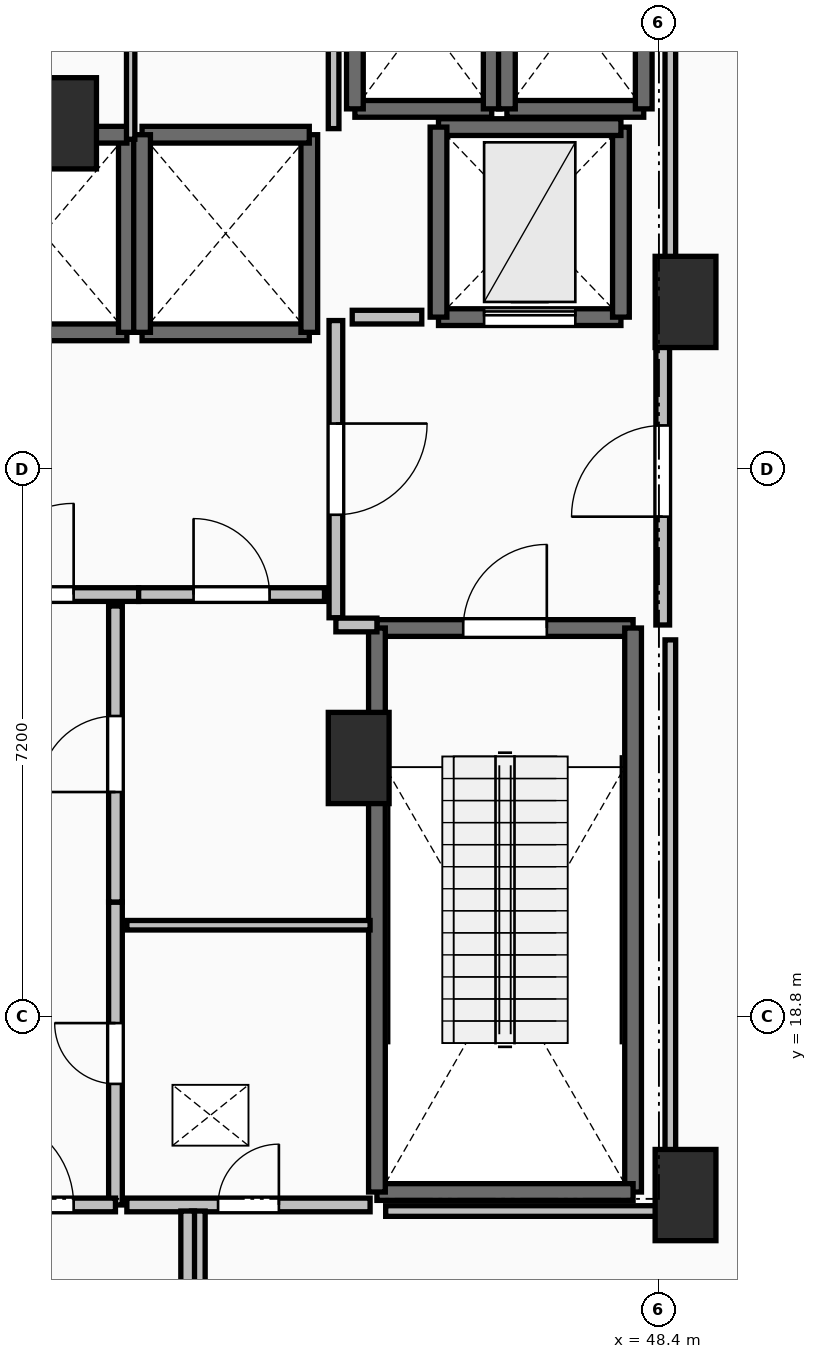
"""IFC4 building model, lengths in metres.
Left out: names, types, materials, properties, quantities, classifications, styles, units other than length and angle.
Written with IfcOpenShell. Run it as: python <this file> out.ifc"""

import sys

from ifc_helpers import new_model, si_unit, direction, frame, frame_2d, origin, origin_2d, place, context, subcontext, project, spatial, rectangle, extrude, element, fill, save


model = new_model("IFC4")
c1 = context("Model", 3, precision=1e-05, world=origin(), true_north=direction((0.0, 1.0)))
c2 = subcontext(c1, "Body", "Model", "MODEL_VIEW")
j1 = project(units=[si_unit("LENGTHUNIT", "METRE"), si_unit("PLANEANGLEUNIT", "RADIAN")], contexts=[c1])
p1 = place(None, origin())
s1 = spatial("IfcSite", under=j1, at=p1, CompositionType="ELEMENT")
p2 = place(p1, origin())
s2 = spatial("IfcBuilding", under=s1, at=p2, CompositionType="ELEMENT")
p3 = place(p2, frame((0.0, 0.0, 14.4)))
s3 = spatial("IfcBuildingStorey", under=s2, at=p3, CompositionType="ELEMENT", Elevation=14.4)
for number, where, z_axis, x_axis in (
    (1, (48.75, 28.2, 0.0), (0.0, 0.0, 1.0), (1.0, 0.0, 0.0)),
    (2, (48.75, 16.45, 0.0), (0.0, 0.0, 1.0), (1.0, 0.0, 0.0)),
    (3, (44.45, 22.2, 0.0), (0.0, 0.0, 1.0), (1.0, 0.0, 0.0)),
    (4, (40.6, 30.55, 0.0), (0.0, 0.0, 1.0), (1.0, 0.0, 0.0)),
):
    element("IfcColumn", number, at=place(p3, frame(where, z_axis=z_axis, x_axis=x_axis)), inside=s3, PredefinedType="PILASTER", context=c2, shape_type="SweptSolid", body=[
        extrude(rectangle(XDim=0.8, YDim=1.2, at=origin_2d()), origin(), (0.0, 0.0, 1.0), 4.8),
    ])
p4 = place(p3, frame((44.69, 23.91, 0.0), z_axis=(0.0, 0.0, 1.0), x_axis=(1.0, 0.0, 0.0)))
e5 = element("IfcWall", 5, at=p4, inside=s3, PredefinedType="SOLIDWALL", context=c2, shape_type="SweptSolid", body=[
    extrude(rectangle(XDim=3.37, YDim=0.22, at=frame_2d((1.685, 0.0))), origin(), (0.0, 0.0, 1.0), 4.48),
])
p5 = place(p4, frame((1.135, 0.0, 0.0)))
e6 = element("IfcOpeningElement", 6, at=p5, cuts=e5, PredefinedType="OPENING", context=c2, shape_type="SweptSolid", body=[
    extrude(rectangle(XDim=1.1, YDim=2.15, at=frame_2d((0.55, 1.075))), frame((0.0, 0.125, 0.0), z_axis=(0.0, -1.0, 0.0), x_axis=(1.0, 0.0, 0.0)), (0.0, 0.0, 1.0), 0.25),
])
p6 = place(p3, frame((48.06, 23.91, 0.0), z_axis=(0.0, 0.0, 1.0), x_axis=(0.0, -1.0, 0.0)))
e7 = element("IfcWall", 7, at=p6, inside=s3, PredefinedType="SOLIDWALL", context=c2, shape_type="SweptSolid", body=[
    extrude(rectangle(XDim=7.42, YDim=0.22, at=frame_2d((3.71, 0.0))), origin(), (0.0, 0.0, 1.0), 4.48),
])
p7 = place(p3, frame((48.06, 16.49, 0.0), z_axis=(0.0, 0.0, 1.0), x_axis=(-1.0, 0.0, 0.0)))
e8 = element("IfcWall", 8, at=p7, inside=s3, PredefinedType="SOLIDWALL", context=c2, shape_type="SweptSolid", body=[
    extrude(rectangle(XDim=3.37, YDim=0.22, at=frame_2d((1.685, 0.0))), origin(), (0.0, 0.0, 1.0), 4.48),
])
p8 = place(p3, frame((44.69, 16.49, 0.0), z_axis=(0.0, 0.0, 1.0), x_axis=(0.0, 1.0, 0.0)))
e9 = element("IfcWall", 9, at=p8, inside=s3, PredefinedType="SOLIDWALL", context=c2, shape_type="SweptSolid", body=[
    extrude(rectangle(XDim=7.42, YDim=0.22, at=frame_2d((3.71, 0.0))), origin(), (0.0, 0.0, 1.0), 4.48),
])
p9 = place(p3, frame((39.2, 27.8, 0.0), z_axis=(0.0, 0.0, 1.0), x_axis=(1.0, 0.0, 0.0)))
e10 = element("IfcWall", 10, at=p9, inside=s3, PredefinedType="SOLIDWALL", context=c2, shape_type="SweptSolid", body=[
    extrude(rectangle(XDim=2.2, YDim=0.22, at=frame_2d((1.1, 0.0))), origin(), (0.0, 0.0, 1.0), 4.48),
])
p10 = place(p3, frame((41.4, 27.8, 0.0), z_axis=(0.0, 0.0, 1.0), x_axis=(0.0, 1.0, 0.0)))
e11 = element("IfcWall", 11, at=p10, inside=s3, PredefinedType="SOLIDWALL", context=c2, shape_type="SweptSolid", body=[
    extrude(rectangle(XDim=2.6, YDim=0.22, at=frame_2d((1.3, 0.0))), origin(), (0.0, 0.0, 1.0), 4.48),
])
for number, where, z_axis, x_axis in (
    (12, (41.4, 30.4, 0.0), (0.0, 0.0, 1.0), (-1.0, 0.0, 0.0)),
    (13, (41.6, 27.8, 0.0), (0.0, 0.0, 1.0), (1.0, 0.0, 0.0)),
):
    element("IfcWall", number, at=place(p3, frame(where, z_axis=z_axis, x_axis=x_axis)), inside=s3, PredefinedType="SOLIDWALL", context=c2, shape_type="SweptSolid", body=[
        extrude(rectangle(XDim=2.2, YDim=0.22, at=frame_2d((1.1, 0.0))), origin(), (0.0, 0.0, 1.0), 4.48),
    ])
p11 = place(p3, frame((43.8, 27.8, 0.0), z_axis=(0.0, 0.0, 1.0), x_axis=(0.0, 1.0, 0.0)))
e14 = element("IfcWall", 14, at=p11, inside=s3, PredefinedType="SOLIDWALL", context=c2, shape_type="SweptSolid", body=[
    extrude(rectangle(XDim=2.6, YDim=0.22, at=frame_2d((1.3, 0.0))), origin(), (0.0, 0.0, 1.0), 4.48),
])
p12 = place(p3, frame((43.8, 30.4, 0.0), z_axis=(0.0, 0.0, 1.0), x_axis=(-1.0, 0.0, 0.0)))
e15 = element("IfcWall", 15, at=p12, inside=s3, PredefinedType="SOLIDWALL", context=c2, shape_type="SweptSolid", body=[
    extrude(rectangle(XDim=2.2, YDim=0.22, at=frame_2d((1.1, 0.0))), origin(), (0.0, 0.0, 1.0), 4.48),
])
p13 = place(p3, frame((41.6, 30.4, 0.0), z_axis=(0.0, 0.0, 1.0), x_axis=(0.0, -1.0, 0.0)))
e16 = element("IfcWall", 16, at=p13, inside=s3, PredefinedType="SOLIDWALL", context=c2, shape_type="SweptSolid", body=[
    extrude(rectangle(XDim=2.6, YDim=0.22, at=frame_2d((1.3, 0.0))), origin(), (0.0, 0.0, 1.0), 4.48),
])
p14 = place(p3, frame((44.4, 30.74, 0.0), z_axis=(0.0, 0.0, 1.0), x_axis=(1.0, 0.0, 0.0)))
e17 = element("IfcWall", 17, at=p14, inside=s3, PredefinedType="SOLIDWALL", context=c2, shape_type="SweptSolid", body=[
    extrude(rectangle(XDim=1.8, YDim=0.22, at=frame_2d((0.9, 0.0))), origin(), (0.0, 0.0, 1.0), 4.48),
])
for number, where, z_axis, x_axis in (
    (18, (46.2, 30.74, 0.0), (0.0, 0.0, 1.0), (0.0, 1.0, 0.0)),
    (19, (44.4, 33.16, 0.0), (0.0, 0.0, 1.0), (0.0, -1.0, 0.0)),
):
    element("IfcWall", number, at=place(p3, frame(where, z_axis=z_axis, x_axis=x_axis)), inside=s3, PredefinedType="SOLIDWALL", context=c2, shape_type="SweptSolid", body=[
        extrude(rectangle(XDim=2.42, YDim=0.22, at=frame_2d((1.21, 0.0))), origin(), (0.0, 0.0, 1.0), 4.48),
    ])
p15 = place(p3, frame((46.4, 30.74, 0.0), z_axis=(0.0, 0.0, 1.0), x_axis=(1.0, 0.0, 0.0)))
e20 = element("IfcWall", 20, at=p15, inside=s3, PredefinedType="SOLIDWALL", context=c2, shape_type="SweptSolid", body=[
    extrude(rectangle(XDim=1.8, YDim=0.22, at=frame_2d((0.9, 0.0))), origin(), (0.0, 0.0, 1.0), 4.48),
])
for number, where, z_axis, x_axis in (
    (21, (48.2, 30.74, 0.0), (0.0, 0.0, 1.0), (0.0, 1.0, 0.0)),
    (22, (46.4, 33.16, 0.0), (0.0, 0.0, 1.0), (0.0, -1.0, 0.0)),
):
    element("IfcWall", number, at=place(p3, frame(where, z_axis=z_axis, x_axis=x_axis)), inside=s3, PredefinedType="SOLIDWALL", context=c2, shape_type="SweptSolid", body=[
        extrude(rectangle(XDim=2.42, YDim=0.22, at=frame_2d((1.21, 0.0))), origin(), (0.0, 0.0, 1.0), 4.48),
    ])
p16 = place(p3, frame((45.5, 28.0, 0.0), z_axis=(0.0, 0.0, 1.0), x_axis=(1.0, 0.0, 0.0)))
e23 = element("IfcWall", 23, at=p16, inside=s3, PredefinedType="SHEAR", context=c2, shape_type="SweptSolid", body=[
    extrude(rectangle(XDim=2.4, YDim=0.22, at=frame_2d((1.2, 0.0))), origin(), (0.0, 0.0, 1.0), 4.48),
])
p17 = place(p16, frame((0.6, 0.0, 0.0)))
e24 = element("IfcOpeningElement", 24, at=p17, cuts=e23, PredefinedType="OPENING", context=c2, shape_type="SweptSolid", body=[
    extrude(rectangle(XDim=1.2, YDim=2.2, at=frame_2d((0.6, 1.1))), frame((0.0, 0.125, 0.0), z_axis=(0.0, -1.0, 0.0), x_axis=(1.0, 0.0, 0.0)), (0.0, 0.0, 1.0), 0.25),
])
p18 = place(p3, frame((47.9, 28.0, 0.0), z_axis=(0.0, 0.0, 1.0), x_axis=(0.0, 1.0, 0.0)))
e25 = element("IfcWall", 25, at=p18, inside=s3, PredefinedType="SHEAR", context=c2, shape_type="SweptSolid", body=[
    extrude(rectangle(XDim=2.5, YDim=0.22, at=frame_2d((1.25, 0.0))), origin(), (0.0, 0.0, 1.0), 4.48),
])
p19 = place(p3, frame((47.9, 30.5, 0.0), z_axis=(0.0, 0.0, 1.0), x_axis=(-1.0, 0.0, 0.0)))
e26 = element("IfcWall", 26, at=p19, inside=s3, PredefinedType="SHEAR", context=c2, shape_type="SweptSolid", body=[
    extrude(rectangle(XDim=2.4, YDim=0.22, at=frame_2d((1.2, 0.0))), origin(), (0.0, 0.0, 1.0), 4.48),
])
p20 = place(p3, frame((45.5, 30.5, 0.0), z_axis=(0.0, 0.0, 1.0), x_axis=(0.0, -1.0, 0.0)))
e27 = element("IfcWall", 27, at=p20, inside=s3, PredefinedType="SHEAR", context=c2, shape_type="SweptSolid", body=[
    extrude(rectangle(XDim=2.5, YDim=0.22, at=frame_2d((1.25, 0.0))), origin(), (0.0, 0.0, 1.0), 4.48),
])
p21 = place(p3, frame((44.15, 27.955, 0.0), z_axis=(0.0, 0.0, 1.0), x_axis=(0.0, -1.0, 0.0)))
e28 = element("IfcWall", 28, at=p21, inside=s3, PredefinedType="PARTITIONING", context=c2, shape_type="SweptSolid", body=[
    extrude(rectangle(XDim=3.91, YDim=0.18, at=frame_2d((1.955, 0.0))), origin(), (0.0, 0.0, 1.0), 4.48),
])
p22 = place(p21, frame((1.355, 0.0, 0.0)))
e29 = element("IfcOpeningElement", 29, at=p22, cuts=e28, PredefinedType="OPENING", context=c2, shape_type="SweptSolid", body=[
    extrude(rectangle(XDim=1.2, YDim=2.15, at=frame_2d((0.6, 1.075))), frame((0.0, 0.105, 0.0), z_axis=(0.0, -1.0, 0.0), x_axis=(1.0, 0.0, 0.0)), (0.0, 0.0, 1.0), 0.21),
])
p23 = place(p3, frame((44.15, 23.95, 0.0), z_axis=(0.0, 0.0, 1.0), x_axis=(1.0, 0.0, 0.0)))
e30 = element("IfcWall", 30, at=p23, inside=s3, PredefinedType="PARTITIONING", context=c2, shape_type="SweptSolid", body=[
    extrude(rectangle(XDim=0.54, YDim=0.18, at=frame_2d((0.27, 0.0))), origin(), (0.0, 0.0, 1.0), 4.48),
])
p24 = place(p3, frame((48.45, 23.95, 0.0), z_axis=(0.0, 0.0, 1.0), x_axis=(0.0, 1.0, 0.0)))
e31 = element("IfcWall", 31, at=p24, inside=s3, PredefinedType="PARTITIONING", context=c2, shape_type="SweptSolid", body=[
    extrude(rectangle(XDim=4.05, YDim=0.18, at=frame_2d((2.025, 0.0))), origin(), (0.0, 0.0, 1.0), 4.48),
])
p25 = place(p24, frame((1.425, 0.0, 0.0)))
e32 = element("IfcOpeningElement", 32, at=p25, cuts=e31, PredefinedType="OPENING", context=c2, shape_type="SweptSolid", body=[
    extrude(rectangle(XDim=1.2, YDim=2.15, at=frame_2d((0.6, 1.075))), frame((0.0, 0.105, 0.0), z_axis=(0.0, -1.0, 0.0), x_axis=(1.0, 0.0, 0.0)), (0.0, 0.0, 1.0), 0.21),
])
p26 = place(p3, frame((38.645, 24.35, 0.0), z_axis=(0.0, 0.0, 1.0), x_axis=(1.0, 0.0, 0.0)))
e33 = element("IfcWall", 33, at=p26, inside=s3, PredefinedType="PARTITIONING", context=c2, shape_type="SweptSolid", body=[
    extrude(rectangle(XDim=2.91, YDim=0.18, at=frame_2d((1.455, 0.0))), origin(), (0.0, 0.0, 1.0), 4.48),
])
p27 = place(p26, frame((0.855, 0.0, 0.0)))
e34 = element("IfcOpeningElement", 34, at=p27, cuts=e33, PredefinedType="OPENING", context=c2, shape_type="SweptSolid", body=[
    extrude(rectangle(XDim=1.2, YDim=2.15, at=frame_2d((0.6, 1.075))), frame((0.0, 0.105, 0.0), z_axis=(0.0, -1.0, 0.0), x_axis=(1.0, 0.0, 0.0)), (0.0, 0.0, 1.0), 0.21),
])
p28 = place(p3, frame((41.555, 24.35, 0.0), z_axis=(0.0, 0.0, 1.0), x_axis=(1.0, 0.0, 0.0)))
e35 = element("IfcWall", 35, at=p28, inside=s3, PredefinedType="PARTITIONING", context=c2, shape_type="SweptSolid", body=[
    extrude(rectangle(XDim=2.445, YDim=0.18, at=frame_2d((1.223, 0.0))), origin(), (0.0, 0.0, 1.0), 4.48),
])
p29 = place(p28, frame((0.722, 0.0, 0.0)))
e36 = element("IfcOpeningElement", 36, at=p29, cuts=e35, PredefinedType="OPENING", context=c2, shape_type="SweptSolid", body=[
    extrude(rectangle(XDim=1.0, YDim=2.15, at=frame_2d((0.5, 1.075))), frame((0.0, 0.105, 0.0), z_axis=(0.0, -1.0, 0.0), x_axis=(1.0, 0.0, 0.0)), (0.0, 0.0, 1.0), 0.21),
])
p30 = place(p3, frame((41.25, 16.32, 0.0), z_axis=(0.0, 0.0, 1.0), x_axis=(0.0, 1.0, 0.0)))
e37 = element("IfcWall", 37, at=p30, inside=s3, PredefinedType="PARTITIONING", context=c2, shape_type="SweptSolid", body=[
    extrude(rectangle(XDim=3.985, YDim=0.18, at=frame_2d((1.992, 0.0))), origin(), (0.0, 0.0, 1.0), 4.48),
])
p31 = place(p30, frame((1.593, 0.0, 0.0)))
e38 = element("IfcOpeningElement", 38, at=p31, cuts=e37, PredefinedType="OPENING", context=c2, shape_type="SweptSolid", body=[
    extrude(rectangle(XDim=0.8, YDim=2.05, at=frame_2d((0.4, 1.025))), frame((0.0, 0.105, 0.0), z_axis=(0.0, -1.0, 0.0), x_axis=(1.0, 0.0, 0.0)), (0.0, 0.0, 1.0), 0.21),
])
p32 = place(p3, frame((41.25, 20.305, 0.0), z_axis=(0.0, 0.0, 1.0), x_axis=(0.0, 1.0, 0.0)))
e39 = element("IfcWall", 39, at=p32, inside=s3, PredefinedType="PARTITIONING", context=c2, shape_type="SweptSolid", body=[
    extrude(rectangle(XDim=3.895, YDim=0.18, at=frame_2d((1.948, 0.0))), origin(), (0.0, 0.0, 1.0), 4.48),
])
p33 = place(p32, frame((1.448, 0.0, 0.0)))
e40 = element("IfcOpeningElement", 40, at=p33, cuts=e39, PredefinedType="OPENING", context=c2, shape_type="SweptSolid", body=[
    extrude(rectangle(XDim=1.0, YDim=2.15, at=frame_2d((0.5, 1.075))), frame((0.0, 0.105, 0.0), z_axis=(0.0, -1.0, 0.0), x_axis=(1.0, 0.0, 0.0)), (0.0, 0.0, 1.0), 0.21),
])
p34 = place(p3, frame((38.95, 16.32, 0.0), z_axis=(0.0, 0.0, 1.0), x_axis=(1.0, 0.0, 0.0)))
e41 = element("IfcWall", 41, at=p34, inside=s3, PredefinedType="PARTITIONING", context=c2, shape_type="SweptSolid", body=[
    extrude(rectangle(XDim=2.3, YDim=0.18, at=frame_2d((1.15, 0.0))), origin(), (0.0, 0.0, 1.0), 4.48),
])
p35 = place(p34, frame((0.55, 0.0, 0.0)))
e42 = element("IfcOpeningElement", 42, at=p35, cuts=e41, PredefinedType="OPENING", context=c2, shape_type="SweptSolid", body=[
    extrude(rectangle(XDim=1.2, YDim=2.15, at=frame_2d((0.6, 1.075))), frame((0.0, 0.105, 0.0), z_axis=(0.0, -1.0, 0.0), x_axis=(1.0, 0.0, 0.0)), (0.0, 0.0, 1.0), 0.21),
])
p36 = place(p3, frame((44.6, 20.0, 0.0), z_axis=(0.0, 0.0, 1.0), x_axis=(-1.0, 0.0, 0.0)))
e43 = element("IfcWall", 43, at=p36, inside=s3, PredefinedType="PARTITIONING", context=c2, shape_type="SweptSolid", body=[
    extrude(rectangle(XDim=3.2, YDim=0.125, at=frame_2d((1.6, 0.0))), origin(), (0.0, 0.0, 1.0), 4.48),
])
p37 = place(p3, frame((41.4, 16.32, 0.0), z_axis=(0.0, 0.0, 1.0), x_axis=(1.0, 0.0, 0.0)))
e44 = element("IfcWall", 44, at=p37, inside=s3, PredefinedType="PARTITIONING", context=c2, shape_type="SweptSolid", body=[
    extrude(rectangle(XDim=3.2, YDim=0.18, at=frame_2d((1.6, 0.0))), origin(), (0.0, 0.0, 1.0), 4.48),
])
p38 = place(p37, frame((1.2, 0.0, 0.0)))
e45 = element("IfcOpeningElement", 45, at=p38, cuts=e44, PredefinedType="OPENING", context=c2, shape_type="SweptSolid", body=[
    extrude(rectangle(XDim=0.8, YDim=2.05, at=frame_2d((0.4, 1.025))), frame((0.0, 0.105, 0.0), z_axis=(0.0, -1.0, 0.0), x_axis=(1.0, 0.0, 0.0)), (0.0, 0.0, 1.0), 0.21),
])
p39 = place(p3, frame((41.45, 30.34, 0.0), z_axis=(0.0, 0.0, 1.0), x_axis=(0.0, 1.0, 0.0)))
e46 = element("IfcWall", 46, at=p39, inside=s3, PredefinedType="PARTITIONING", context=c2, shape_type="SweptSolid", body=[
    extrude(rectangle(XDim=3.56, YDim=0.11, at=frame_2d((1.78, 0.0))), origin(), (0.0, 0.0, 1.0), 4.48),
])
for number, where, z_axis, x_axis in (
    (47, (42.34, 16.24, 0.0), (0.0, 0.0, 1.0), (0.0, -1.0, 0.0)),
    (48, (42.2, 14.1, 0.0), (0.0, 0.0, 1.0), (0.0, 1.0, 0.0)),
):
    element("IfcWall", number, at=place(p3, frame(where, z_axis=z_axis, x_axis=x_axis)), inside=s3, PredefinedType="PARTITIONING", context=c2, shape_type="SweptSolid", body=[
        extrude(rectangle(XDim=2.14, YDim=0.18, at=frame_2d((1.07, 0.0))), origin(), (0.0, 0.0, 1.0), 4.48),
    ])
p40 = place(p3, frame((45.28, 28.0, 0.0), z_axis=(0.0, 0.0, 1.0), x_axis=(-1.0, 0.0, 0.0)))
e49 = element("IfcWall", 49, at=p40, inside=s3, PredefinedType="PARTITIONING", context=c2, shape_type="SweptSolid", body=[
    extrude(rectangle(XDim=0.915, YDim=0.18, at=frame_2d((0.458, 0.0))), origin(), (0.0, 0.0, 1.0), 4.48),
])
p41 = place(p3, frame((44.12, 30.48, 0.0), z_axis=(0.0, 0.0, 1.0), x_axis=(0.0, 1.0, 0.0)))
e50 = element("IfcWall", 50, at=p41, inside=s3, PredefinedType="PARTITIONING", context=c2, shape_type="SweptSolid", body=[
    extrude(rectangle(XDim=2.41, YDim=0.14, at=frame_2d((1.205, 0.0))), origin(), (0.0, 0.0, 1.0), 4.48),
])
p42 = place(p3, frame((48.55, 33.45, 0.0), z_axis=(0.0, 0.0, 1.0), x_axis=(0.0, -1.0, 0.0)))
e51 = element("IfcWall", 51, at=p42, inside=s3, PredefinedType="PARTITIONING", context=c2, shape_type="SweptSolid", body=[
    extrude(rectangle(XDim=5.254, YDim=0.14, at=frame_2d((2.627, 0.0))), origin(), (0.0, 0.0, 1.0), 3.672),
])
p43 = place(p3, frame((48.55, 23.754, 0.0), z_axis=(0.0, 0.0, 1.0), x_axis=(0.0, -1.0, 0.0)))
e52 = element("IfcWall", 52, at=p43, inside=s3, PredefinedType="PARTITIONING", context=c2, shape_type="SweptSolid", body=[
    extrude(rectangle(XDim=7.514, YDim=0.14, at=frame_2d((3.757, 0.0))), origin(), (0.0, 0.0, 1.0), 2.406),
])
p44 = place(p3, frame((48.55, 16.24, 0.0), z_axis=(0.0, 0.0, 1.0), x_axis=(-1.0, 0.0, 0.0)))
e53 = element("IfcWall", 53, at=p44, inside=s3, PredefinedType="PARTITIONING", context=c2, shape_type="SweptSolid", body=[
    extrude(rectangle(XDim=3.745, YDim=0.14, at=frame_2d((1.873, 0.0))), origin(), (0.0, 0.0, 1.0), 3.672),
])
p45 = place(p5, origin())
e54 = element("IfcDoor", 54, at=p45, inside=s3, OperationType="SINGLE_SWING_RIGHT", PredefinedType="DOOR", context=c2, shape_type="SweptSolid", body=[
    extrude(rectangle(XDim=1.1, YDim=2.15, at=frame_2d((0.55, 1.075))), frame((0.0, 0.025, 0.0), z_axis=(0.0, -1.0, 0.0), x_axis=(1.0, 0.0, 0.0)), (0.0, 0.0, 1.0), 0.05),
])
fill(e6, e54)
p46 = place(p17, origin())
e55 = element("IfcDoor", 55, at=p46, inside=s3, OperationType="SLIDING_TO_LEFT", PredefinedType="DOOR", context=c2, shape_type="SweptSolid", body=[
    extrude(rectangle(XDim=1.2, YDim=2.2, at=frame_2d((0.6, 1.1))), frame((0.0, 0.025, 0.0), z_axis=(0.0, -1.0, 0.0), x_axis=(1.0, 0.0, 0.0)), (0.0, 0.0, 1.0), 0.05),
])
fill(e24, e55)
p47 = place(p22, origin())
e56 = element("IfcDoor", 56, at=p47, inside=s3, OperationType="SINGLE_SWING_LEFT", PredefinedType="DOOR", context=c2, shape_type="SweptSolid", body=[
    extrude(rectangle(XDim=1.2, YDim=2.15, at=frame_2d((0.6, 1.075))), frame((0.0, 0.025, 0.0), z_axis=(0.0, -1.0, 0.0), x_axis=(1.0, 0.0, 0.0)), (0.0, 0.0, 1.0), 0.05),
])
fill(e29, e56)
p48 = place(p25, origin())
e57 = element("IfcDoor", 57, at=p48, inside=s3, OperationType="SINGLE_SWING_LEFT", PredefinedType="DOOR", context=c2, shape_type="SweptSolid", body=[
    extrude(rectangle(XDim=1.2, YDim=2.15, at=frame_2d((0.6, 1.075))), frame((0.0, 0.025, 0.0), z_axis=(0.0, -1.0, 0.0), x_axis=(1.0, 0.0, 0.0)), (0.0, 0.0, 1.0), 0.05),
])
fill(e32, e57)
p49 = place(p27, origin())
e58 = element("IfcDoor", 58, at=p49, inside=s3, OperationType="SINGLE_SWING_RIGHT", PredefinedType="DOOR", context=c2, shape_type="SweptSolid", body=[
    extrude(rectangle(XDim=1.2, YDim=2.15, at=frame_2d((0.6, 1.075))), frame((0.0, 0.025, 0.0), z_axis=(0.0, -1.0, 0.0), x_axis=(1.0, 0.0, 0.0)), (0.0, 0.0, 1.0), 0.05),
])
fill(e34, e58)
p50 = place(p29, origin())
e59 = element("IfcDoor", 59, at=p50, inside=s3, OperationType="SINGLE_SWING_LEFT", PredefinedType="DOOR", context=c2, shape_type="SweptSolid", body=[
    extrude(rectangle(XDim=1.0, YDim=2.15, at=frame_2d((0.5, 1.075))), frame((0.0, 0.025, 0.0), z_axis=(0.0, -1.0, 0.0), x_axis=(1.0, 0.0, 0.0)), (0.0, 0.0, 1.0), 0.05),
])
fill(e36, e59)
p51 = place(p31, origin())
e60 = element("IfcDoor", 60, at=p51, inside=s3, OperationType="SINGLE_SWING_RIGHT", PredefinedType="DOOR", context=c2, shape_type="SweptSolid", body=[
    extrude(rectangle(XDim=0.8, YDim=2.05, at=frame_2d((0.4, 1.025))), frame((0.0, 0.025, 0.0), z_axis=(0.0, -1.0, 0.0), x_axis=(1.0, 0.0, 0.0)), (0.0, 0.0, 1.0), 0.05),
])
fill(e38, e60)
p52 = place(p33, origin())
e61 = element("IfcDoor", 61, at=p52, inside=s3, OperationType="SINGLE_SWING_LEFT", PredefinedType="DOOR", context=c2, shape_type="SweptSolid", body=[
    extrude(rectangle(XDim=1.0, YDim=2.15, at=frame_2d((0.5, 1.075))), frame((0.0, 0.025, 0.0), z_axis=(0.0, -1.0, 0.0), x_axis=(1.0, 0.0, 0.0)), (0.0, 0.0, 1.0), 0.05),
])
fill(e40, e61)
p53 = place(p35, origin())
e62 = element("IfcDoor", 62, at=p53, inside=s3, OperationType="SINGLE_SWING_LEFT", PredefinedType="DOOR", context=c2, shape_type="SweptSolid", body=[
    extrude(rectangle(XDim=1.2, YDim=2.15, at=frame_2d((0.6, 1.075))), frame((0.0, 0.025, 0.0), z_axis=(0.0, -1.0, 0.0), x_axis=(1.0, 0.0, 0.0)), (0.0, 0.0, 1.0), 0.05),
])
fill(e42, e62)
p54 = place(p38, origin())
e63 = element("IfcDoor", 63, at=p54, inside=s3, OperationType="SINGLE_SWING_RIGHT", PredefinedType="DOOR", context=c2, shape_type="SweptSolid", body=[
    extrude(rectangle(XDim=0.8, YDim=2.05, at=frame_2d((0.4, 1.025))), frame((0.0, 0.025, 0.0), z_axis=(0.0, -1.0, 0.0), x_axis=(1.0, 0.0, 0.0)), (0.0, 0.0, 1.0), 0.05),
])
fill(e45, e63)
save(model, sys.argv[1])
